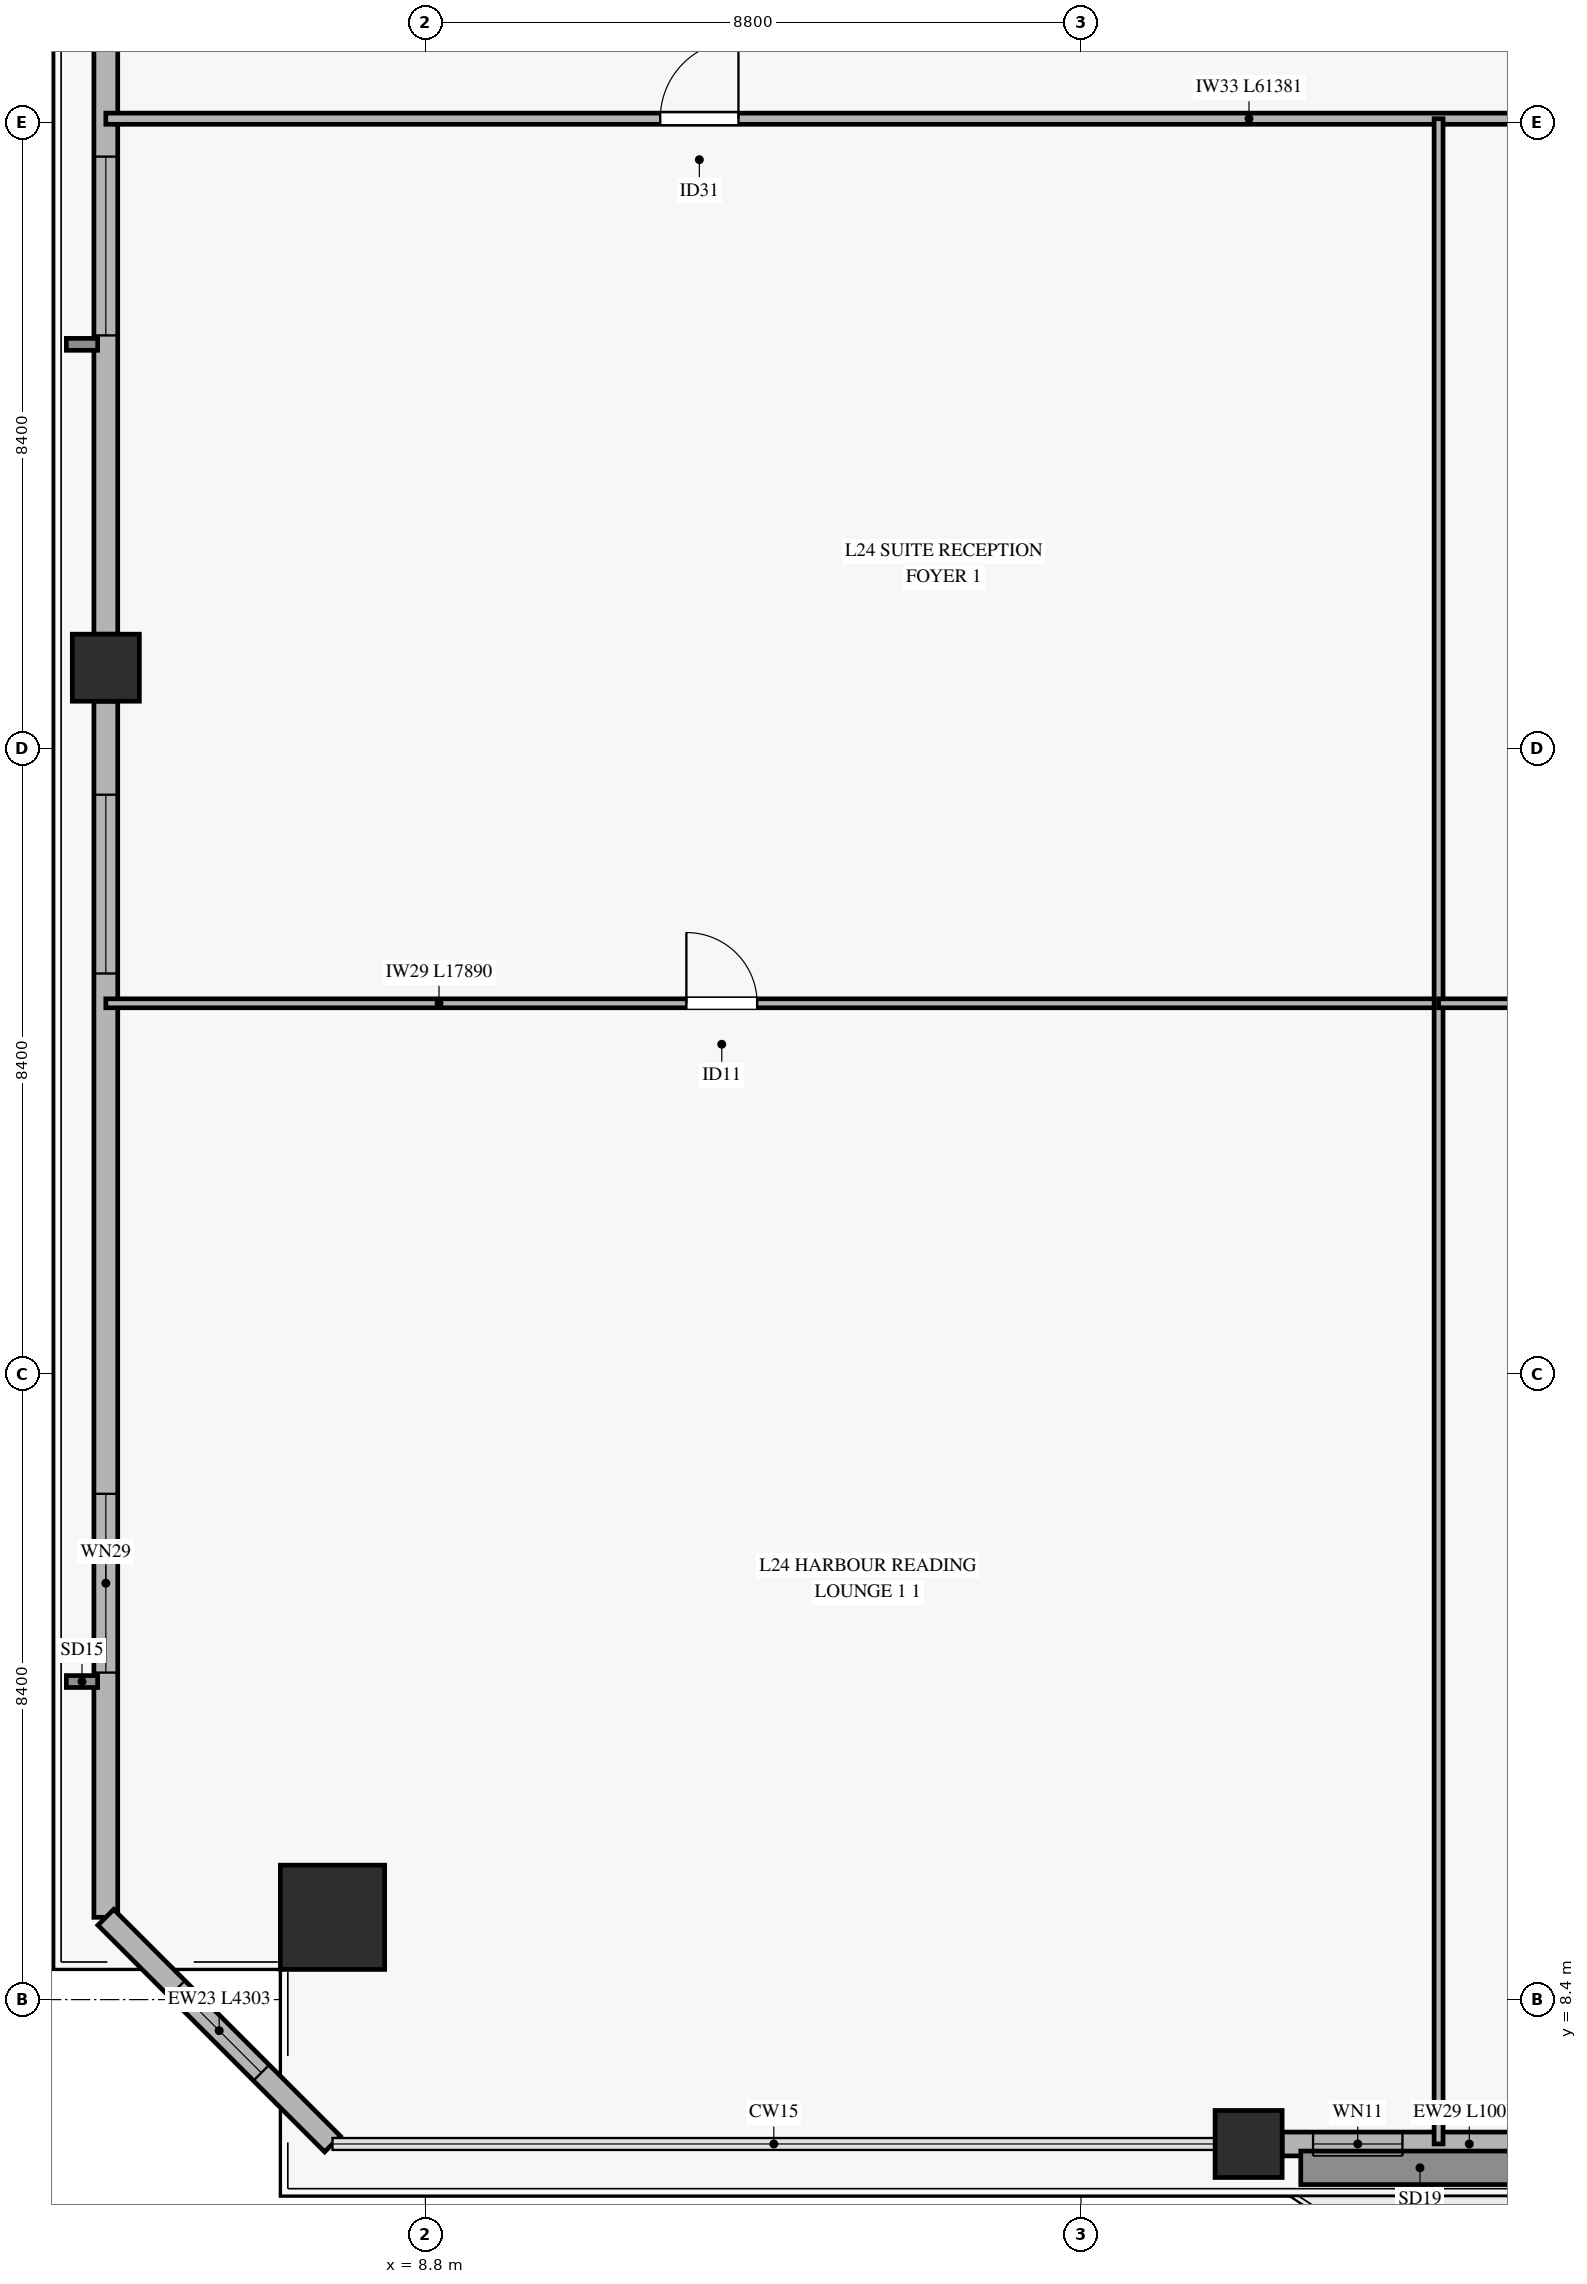
"""IFC4 building model, lengths in metres.
Left out: names, types, materials, properties, quantities, classifications, styles, units other than length and angle.
Written with IfcOpenShell. Run it as: python <this file> out.ifc"""

import sys

from ifc_helpers import new_model, si_unit, direction, frame, frame_2d, origin, origin_2d, place, context, subcontext, project, spatial, rectangle, hollow_rectangle, extrude, source, transform, mapped, element, fill, save


model = new_model("IFC4")
c1 = context("Model", 3, precision=1e-05, world=origin(), true_north=direction((0.0, 1.0)))
c2 = subcontext(c1, "Body", "Model", "MODEL_VIEW")
j1 = project(units=[si_unit("LENGTHUNIT", "METRE"), si_unit("PLANEANGLEUNIT", "RADIAN")], contexts=[c1])
p1 = place(None, origin())
s1 = spatial("IfcSite", under=j1, at=p1, CompositionType="ELEMENT")
p2 = place(p1, origin())
s2 = spatial("IfcBuilding", under=s1, at=p2, CompositionType="ELEMENT")
p3 = place(p2, frame((0.0, 0.0, 99.7)))
s3 = spatial("IfcBuildingStorey", under=s2, at=p3, CompositionType="ELEMENT", Elevation=99.7)
m1 = source(origin(), c2, "Body", "SweptSolid", [
    extrude(hollow_rectangle(XDim=1.4, YDim=1.4, WallThickness=0.065, at=origin_2d()), origin(), (0.0, 0.0, 1.0), 3.68),
])
p4 = place(p3, frame((7.553, 9.505, 0.0), z_axis=(0.0, 0.0, 1.0), x_axis=(1.0, 0.0, 0.0)))
e1 = element("IfcColumn", 1, at=p4, inside=s3, PredefinedType="COLUMN", context=c2, shape_type="MappedRepresentation", body=[
    mapped(m1, transform((0.0, 0.0, 0.0), x_axis=(1.0, 0.0, 0.0), y_axis=(0.0, 1.0, 0.0), z_axis=(0.0, 0.0, 1.0), scale=1.0)),
])
m2 = source(origin(), c2, "Body", "SweptSolid", [
    extrude(hollow_rectangle(XDim=0.9, YDim=0.9, WallThickness=0.04, at=origin_2d()), origin(), (0.0, 0.0, 1.0), 3.68),
])
for number, where, z_axis, x_axis in (
    (2, (19.85, 6.462, 0.0), (0.0, 0.0, 1.0), (1.0, 0.0, 0.0)),
    (3, (4.51, 26.28, 0.0), (0.0, 0.0, 1.0), (1.0, 0.0, 0.0)),
):
    element("IfcColumn", number, at=place(p3, frame(where, z_axis=z_axis, x_axis=x_axis)), inside=s3, PredefinedType="COLUMN", context=c2, shape_type="MappedRepresentation", body=[
        mapped(m2, transform((0.0, 0.0, 0.0), x_axis=(1.0, 0.0, 0.0), y_axis=(0.0, 1.0, 0.0), z_axis=(0.0, 0.0, 1.0), scale=1.0)),
    ])
p5 = place(p3, frame((20.3, 6.462, 0.0), z_axis=(0.0, 0.0, 1.0), x_axis=(1.0, 0.0, 0.0)))
e4 = element("IfcWall", 4, at=p5, inside=s3, PredefinedType="SOLIDWALL", context=c2, shape_type="SweptSolid", body=[
    extrude(rectangle(XDim=10.05, YDim=0.32, at=frame_2d((5.025, 0.0))), origin(), (0.0, 0.0, 1.0), 3.16),
])
p6 = place(p5, frame((4.1, 0.0, 0.0)))
e5 = element("IfcOpeningElement", 5, at=p6, cuts=e4, PredefinedType="OPENING", context=c2, shape_type="SweptSolid", body=[
    extrude(rectangle(XDim=1.8, YDim=2.25, at=frame_2d((0.9, 1.125))), frame((0.0, 0.17, 0.0), z_axis=(0.0, -1.0, 0.0), x_axis=(1.0, 0.0, 0.0)), (0.0, 0.0, 1.0), 0.34),
])
p7 = place(p5, frame((0.415, 0.0, 0.45)))
e6 = element("IfcOpeningElement", 6, at=p7, cuts=e4, PredefinedType="OPENING", context=c2, shape_type="SweptSolid", body=[
    extrude(rectangle(XDim=1.2, YDim=2.0, at=frame_2d((0.6, 1.0))), frame((0.0, 0.17, 0.0), z_axis=(0.0, -1.0, 0.0), x_axis=(1.0, 0.0, 0.0)), (0.0, 0.0, 1.0), 0.34),
])
p8 = place(p5, frame((6.9, 0.0, 0.45)))
e7 = element("IfcOpeningElement", 7, at=p8, cuts=e4, PredefinedType="OPENING", context=c2, shape_type="SweptSolid", body=[
    extrude(rectangle(XDim=1.6, YDim=2.0, at=frame_2d((0.8, 1.0))), frame((0.0, 0.17, 0.0), z_axis=(0.0, -1.0, 0.0), x_axis=(1.0, 0.0, 0.0)), (0.0, 0.0, 1.0), 0.34),
])
p9 = place(p3, frame((4.51, 9.505, 0.0), z_axis=(0.0, 0.0, 1.0), x_axis=(0.0, 1.0, 0.0)))
e8 = element("IfcWall", 8, at=p9, inside=s3, PredefinedType="SOLIDWALL", context=c2, shape_type="SweptSolid", body=[
    extrude(rectangle(XDim=16.325, YDim=0.32, at=frame_2d((8.163, 0.0))), origin(), (0.0, 0.0, 1.0), 3.16),
])
p10 = place(p9, frame((3.285, 0.0, 0.45)))
e9 = element("IfcOpeningElement", 9, at=p10, cuts=e8, PredefinedType="OPENING", context=c2, shape_type="SweptSolid", body=[
    extrude(rectangle(XDim=2.4, YDim=2.1, at=frame_2d((1.2, 1.05))), frame((0.0, 0.17, 0.0), z_axis=(0.0, -1.0, 0.0), x_axis=(1.0, 0.0, 0.0)), (0.0, 0.0, 1.0), 0.34),
])
p11 = place(p9, frame((12.67, 0.0, 0.45)))
e10 = element("IfcOpeningElement", 10, at=p11, cuts=e8, PredefinedType="OPENING", context=c2, shape_type="SweptSolid", body=[
    extrude(rectangle(XDim=2.4, YDim=2.1, at=frame_2d((1.2, 1.05))), frame((0.0, 0.17, 0.0), z_axis=(0.0, -1.0, 0.0), x_axis=(1.0, 0.0, 0.0)), (0.0, 0.0, 1.0), 0.34),
])
p12 = place(p3, frame((4.51, 26.73, 0.0), z_axis=(0.0, 0.0, 1.0), x_axis=(0.0, 1.0, 0.0)))
e11 = element("IfcWall", 11, at=p12, inside=s3, PredefinedType="SOLIDWALL", context=c2, shape_type="SweptSolid", body=[
    extrude(rectangle(XDim=16.326, YDim=0.32, at=frame_2d((8.163, 0.0))), origin(), (0.0, 0.0, 1.0), 3.16),
])
p13 = place(p12, frame((4.011, 0.0, 0.45)))
e12 = element("IfcOpeningElement", 12, at=p13, cuts=e11, PredefinedType="OPENING", context=c2, shape_type="SweptSolid", body=[
    extrude(rectangle(XDim=2.4, YDim=2.1, at=frame_2d((1.2, 1.05))), frame((0.0, 0.17, 0.0), z_axis=(0.0, -1.0, 0.0), x_axis=(1.0, 0.0, 0.0)), (0.0, 0.0, 1.0), 0.34),
])
p14 = place(p3, frame((4.51, 9.505, 0.0), z_axis=(0.0, 0.0, 1.0), x_axis=(0.707106781187, -0.707106781187, 0.0)))
e13 = element("IfcWall", 13, at=p14, inside=s3, PredefinedType="SOLIDWALL", context=c2, shape_type="SweptSolid", body=[
    extrude(rectangle(XDim=4.303, YDim=0.3, at=frame_2d((2.152, 0.0))), origin(), (0.0, 0.0, 1.0), 3.16),
])
p15 = place(p14, frame((1.352, 0.0, 0.45)))
e14 = element("IfcOpeningElement", 14, at=p15, cuts=e13, PredefinedType="OPENING", context=c2, shape_type="SweptSolid", body=[
    extrude(rectangle(XDim=1.6, YDim=2.0, at=frame_2d((0.8, 1.0))), frame((0.0, 0.16, 0.0), z_axis=(0.0, -1.0, 0.0), x_axis=(1.0, 0.0, 0.0)), (0.0, 0.0, 1.0), 0.32),
])
p16 = place(p3, frame((4.51, 33.65, 0.0), z_axis=(0.0, 0.0, 1.0), x_axis=(1.0, 0.0, 0.0)))
e15 = element("IfcWall", 15, at=p16, inside=s3, PredefinedType="PARTITIONING", context=c2, shape_type="SweptSolid", body=[
    extrude(rectangle(XDim=61.381, YDim=0.15, at=frame_2d((30.69, 0.0))), origin(), (0.0, 0.0, 1.0), 2.765),
])
p17 = place(p16, frame((7.442, 0.0, 0.0)))
e16 = element("IfcOpeningElement", 16, at=p17, cuts=e15, PredefinedType="OPENING", context=c2, shape_type="SweptSolid", body=[
    extrude(rectangle(XDim=1.05, YDim=2.15, at=frame_2d((0.525, 1.075))), frame((0.0, 0.085, 0.0), z_axis=(0.0, -1.0, 0.0), x_axis=(1.0, 0.0, 0.0)), (0.0, 0.0, 1.0), 0.17),
])
p18 = place(p16, frame((20.776, 0.0, 0.0)))
e17 = element("IfcOpeningElement", 17, at=p18, cuts=e15, PredefinedType="OPENING", context=c2, shape_type="SweptSolid", body=[
    extrude(rectangle(XDim=1.05, YDim=2.15, at=frame_2d((0.525, 1.075))), frame((0.0, 0.085, 0.0), z_axis=(0.0, -1.0, 0.0), x_axis=(1.0, 0.0, 0.0)), (0.0, 0.0, 1.0), 0.17),
])
p19 = place(p16, frame((30.061, 0.0, 0.0)))
e18 = element("IfcOpeningElement", 18, at=p19, cuts=e15, PredefinedType="OPENING", context=c2, shape_type="SweptSolid", body=[
    extrude(rectangle(XDim=1.05, YDim=2.15, at=frame_2d((0.525, 1.075))), frame((0.0, 0.085, 0.0), z_axis=(0.0, -1.0, 0.0), x_axis=(1.0, 0.0, 0.0)), (0.0, 0.0, 1.0), 0.17),
])
p20 = place(p16, frame((47.371, 0.0, 0.0)))
e19 = element("IfcOpeningElement", 19, at=p20, cuts=e15, PredefinedType="OPENING", context=c2, shape_type="SweptSolid", body=[
    extrude(rectangle(XDim=1.05, YDim=2.15, at=frame_2d((0.525, 1.075))), frame((0.0, 0.085, 0.0), z_axis=(0.0, -1.0, 0.0), x_axis=(1.0, 0.0, 0.0)), (0.0, 0.0, 1.0), 0.17),
])
p21 = place(p3, frame((4.51, 21.775, 0.0), z_axis=(0.0, 0.0, 1.0), x_axis=(1.0, 0.0, 0.0)))
e20 = element("IfcWall", 20, at=p21, inside=s3, PredefinedType="PARTITIONING", context=c2, shape_type="SweptSolid", body=[
    extrude(rectangle(XDim=17.89, YDim=0.12, at=frame_2d((8.945, 0.0))), origin(), (0.0, 0.0, 1.0), 2.765),
])
p22 = place(p21, frame((7.793, 0.0, 0.0)))
e21 = element("IfcOpeningElement", 21, at=p22, cuts=e20, PredefinedType="OPENING", context=c2, shape_type="SweptSolid", body=[
    extrude(rectangle(XDim=0.95, YDim=2.1, at=frame_2d((0.475, 1.05))), frame((0.0, 0.07, 0.0), z_axis=(0.0, -1.0, 0.0), x_axis=(1.0, 0.0, 0.0)), (0.0, 0.0, 1.0), 0.14),
])
p23 = place(p3, frame((22.4, 6.462, 0.0), z_axis=(0.0, 0.0, 1.0), x_axis=(0.0, 1.0, 0.0)))
e22 = element("IfcWall", 22, at=p23, inside=s3, PredefinedType="PARTITIONING", context=c2, shape_type="SweptSolid", body=[
    extrude(rectangle(XDim=27.188, YDim=0.12, at=frame_2d((13.594, 0.0))), origin(), (0.0, 0.0, 1.0), 3.165),
])
p24 = place(p3, frame((22.4, 21.775, 0.0), z_axis=(0.0, 0.0, 1.0), x_axis=(1.0, 0.0, 0.0)))
e23 = element("IfcWall", 23, at=p24, inside=s3, PredefinedType="PARTITIONING", context=c2, shape_type="SweptSolid", body=[
    extrude(rectangle(XDim=6.8, YDim=0.12, at=frame_2d((3.4, 0.0))), origin(), (0.0, 0.0, 1.0), 3.215),
])
p25 = place(p24, frame((3.019, 0.0, 0.0)))
e24 = element("IfcOpeningElement", 24, at=p25, cuts=e23, PredefinedType="OPENING", context=c2, shape_type="SweptSolid", body=[
    extrude(rectangle(XDim=0.95, YDim=2.1, at=frame_2d((0.475, 1.05))), frame((0.0, 0.07, 0.0), z_axis=(0.0, -1.0, 0.0), x_axis=(1.0, 0.0, 0.0)), (0.0, 0.0, 1.0), 0.14),
])
m3 = source(origin(), c2, "Body", "SweptSolid", [
    extrude(rectangle(XDim=1.2, YDim=2.0, at=frame_2d((0.6, 1.0))), frame((0.0, 0.03, 0.0), z_axis=(0.0, -1.0, 0.0), x_axis=(1.0, 0.0, 0.0)), (0.0, 0.0, 1.0), 0.06),
])
p26 = place(p7, origin())
e25 = element("IfcWindow", 25, at=p26, inside=s3, PartitioningType="SINGLE_PANEL", PredefinedType="WINDOW", context=c2, shape_type="MappedRepresentation", body=[
    mapped(m3, transform((0.0, 0.0, 0.0), x_axis=(1.0, 0.0, 0.0), y_axis=(0.0, 1.0, 0.0), z_axis=(0.0, 0.0, 1.0), scale=1.0)),
])
fill(e6, e25)
m4 = source(origin(), c2, "Body", "SweptSolid", [
    extrude(rectangle(XDim=2.4, YDim=2.1, at=frame_2d((1.2, 1.05))), frame((0.0, 0.03, 0.0), z_axis=(0.0, -1.0, 0.0), x_axis=(1.0, 0.0, 0.0)), (0.0, 0.0, 1.0), 0.06),
])
p27 = place(p10, origin())
e26 = element("IfcWindow", 26, at=p27, inside=s3, PartitioningType="SINGLE_PANEL", PredefinedType="WINDOW", context=c2, shape_type="MappedRepresentation", body=[
    mapped(m4, transform((0.0, 0.0, 0.0), x_axis=(1.0, 0.0, 0.0), y_axis=(0.0, 1.0, 0.0), z_axis=(0.0, 0.0, 1.0), scale=1.0)),
])
fill(e9, e26)
p28 = place(p11, origin())
e27 = element("IfcWindow", 27, at=p28, inside=s3, PartitioningType="SINGLE_PANEL", PredefinedType="WINDOW", context=c2, shape_type="MappedRepresentation", body=[
    mapped(m4, transform((0.0, 0.0, 0.0), x_axis=(1.0, 0.0, 0.0), y_axis=(0.0, 1.0, 0.0), z_axis=(0.0, 0.0, 1.0), scale=1.0)),
])
fill(e10, e27)
p29 = place(p13, origin())
e28 = element("IfcWindow", 28, at=p29, inside=s3, PartitioningType="SINGLE_PANEL", PredefinedType="WINDOW", context=c2, shape_type="MappedRepresentation", body=[
    mapped(m4, transform((0.0, 0.0, 0.0), x_axis=(1.0, 0.0, 0.0), y_axis=(0.0, 1.0, 0.0), z_axis=(0.0, 0.0, 1.0), scale=1.0)),
])
fill(e12, e28)
m5 = source(origin(), c2, "Body", "SweptSolid", [
    extrude(rectangle(XDim=1.6, YDim=2.0, at=frame_2d((0.8, 1.0))), frame((0.0, 0.03, 0.0), z_axis=(0.0, -1.0, 0.0), x_axis=(1.0, 0.0, 0.0)), (0.0, 0.0, 1.0), 0.06),
])
p30 = place(p15, origin())
e29 = element("IfcWindow", 29, at=p30, inside=s3, PartitioningType="SINGLE_PANEL", PredefinedType="WINDOW", context=c2, shape_type="MappedRepresentation", body=[
    mapped(m5, transform((0.0, 0.0, 0.0), x_axis=(1.0, 0.0, 0.0), y_axis=(0.0, 1.0, 0.0), z_axis=(0.0, 0.0, 1.0), scale=1.0)),
])
fill(e14, e29)
m6 = source(origin(), c2, "Body", "SweptSolid", [
    extrude(rectangle(XDim=1.05, YDim=2.15, at=frame_2d((0.525, 1.075))), frame((0.0, 0.025, 0.0), z_axis=(0.0, -1.0, 0.0), x_axis=(1.0, 0.0, 0.0)), (0.0, 0.0, 1.0), 0.05),
])
p31 = place(p17, origin())
e30 = element("IfcDoor", 30, at=p31, inside=s3, OperationType="SINGLE_SWING_RIGHT", PredefinedType="DOOR", context=c2, shape_type="MappedRepresentation", body=[
    mapped(m6, transform((0.0, 0.0, 0.0), x_axis=(1.0, 0.0, 0.0), y_axis=(0.0, 1.0, 0.0), z_axis=(0.0, 0.0, 1.0), scale=1.0)),
])
fill(e16, e30)
m7 = source(origin(), c2, "Body", "SweptSolid", [
    extrude(rectangle(XDim=0.95, YDim=2.1, at=frame_2d((0.475, 1.05))), frame((0.0, 0.025, 0.0), z_axis=(0.0, -1.0, 0.0), x_axis=(1.0, 0.0, 0.0)), (0.0, 0.0, 1.0), 0.05),
])
p32 = place(p22, origin())
e31 = element("IfcDoor", 31, at=p32, inside=s3, OperationType="SINGLE_SWING_LEFT", PredefinedType="DOOR", context=c2, shape_type="MappedRepresentation", body=[
    mapped(m7, transform((0.0, 0.0, 0.0), x_axis=(1.0, 0.0, 0.0), y_axis=(0.0, 1.0, 0.0), z_axis=(0.0, 0.0, 1.0), scale=1.0)),
])
fill(e21, e31)
save(model, sys.argv[1])
